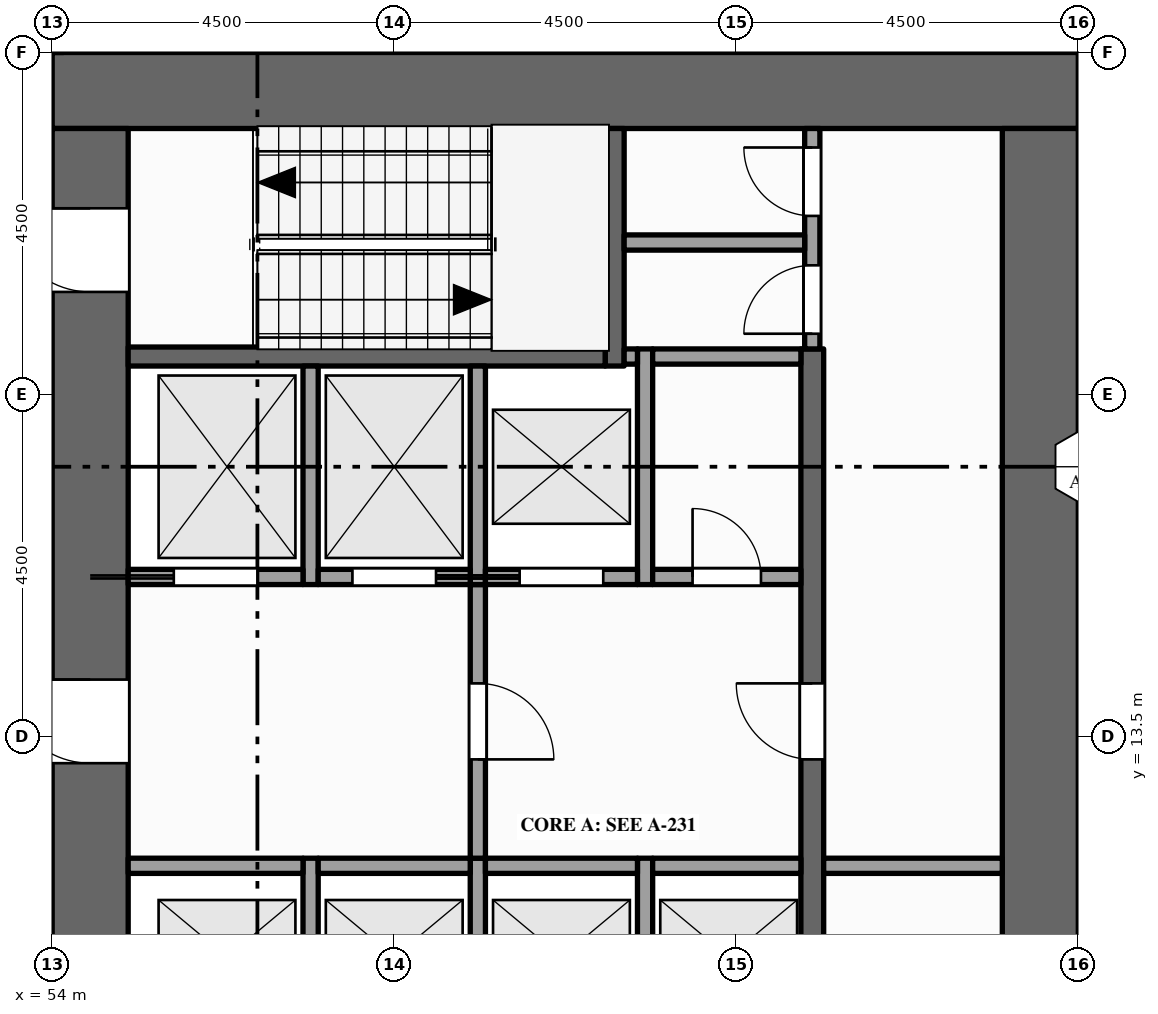
"""IFC4 building model, lengths in metres.
Left out: names, types, materials, properties, quantities, classifications, styles, units other than length and angle.
Written with IfcOpenShell. Run it as: python <this file> out.ifc"""

import sys

from ifc_helpers import new_model, si_unit, direction, frame, frame_2d, origin, place, context, subcontext, project, spatial, rectangle, extrude, element, fill, save


model = new_model("IFC4")
c1 = context("Model", 3, precision=1e-05, world=origin(), true_north=direction((0.0, 1.0)))
c2 = subcontext(c1, "Body", "Model", "MODEL_VIEW")
j1 = project(units=[si_unit("LENGTHUNIT", "METRE"), si_unit("PLANEANGLEUNIT", "RADIAN")], contexts=[c1])
p1 = place(None, origin())
s1 = spatial("IfcSite", under=j1, at=p1, CompositionType="ELEMENT")
p2 = place(p1, origin())
s2 = spatial("IfcBuilding", under=s1, at=p2, CompositionType="ELEMENT")
p3 = place(p2, frame((0.0, 0.0, 171.0)))
s3 = spatial("IfcBuildingStorey", under=s2, at=p3, CompositionType="ELEMENT", Elevation=171.0)
p4 = place(p3, frame((54.0, 22.0, -0.15), z_axis=(0.0, 0.0, 1.0), x_axis=(1.0, 0.0, 0.0)))
e1 = element("IfcWall", 1, at=p4, inside=s3, PredefinedType="SHEAR", context=c2, shape_type="SweptSolid", body=[
    extrude(rectangle(XDim=13.5, YDim=1.0, at=frame_2d((6.75, 0.0))), origin(), (0.0, 0.0, 1.0), 4.0),
])
p5 = place(p3, frame((54.5, 1.0, -0.15), z_axis=(0.0, 0.0, 1.0), x_axis=(0.0, 1.0, 0.0)))
e2 = element("IfcWall", 2, at=p5, inside=s3, PredefinedType="SHEAR", context=c2, shape_type="SweptSolid", body=[
    extrude(rectangle(XDim=20.5, YDim=1.0, at=frame_2d((10.25, 0.0))), origin(), (0.0, 0.0, 1.0), 4.0),
])
p6 = place(p5, frame((6.1, 0.0, 0.15)))
e3 = element("IfcOpeningElement", 3, at=p6, cuts=e2, PredefinedType="OPENING", context=c2, shape_type="SweptSolid", body=[
    extrude(rectangle(XDim=1.8, YDim=2.1, at=frame_2d((0.9, 1.05))), frame((0.0, 0.51, 0.0), z_axis=(0.0, -1.0, 0.0), x_axis=(1.0, 0.0, 0.0)), (0.0, 0.0, 1.0), 1.02),
])
p7 = place(p5, frame((12.15, 0.0, 0.15)))
e4 = element("IfcOpeningElement", 4, at=p7, cuts=e2, PredefinedType="OPENING", context=c2, shape_type="SweptSolid", body=[
    extrude(rectangle(XDim=1.1, YDim=2.1, at=frame_2d((0.55, 1.05))), frame((0.0, 0.51, 0.0), z_axis=(0.0, -1.0, 0.0), x_axis=(1.0, 0.0, 0.0)), (0.0, 0.0, 1.0), 1.02),
])
p8 = place(p5, frame((1.15, 0.0, 0.15)))
e5 = element("IfcOpeningElement", 5, at=p8, cuts=e2, PredefinedType="OPENING", context=c2, shape_type="SweptSolid", body=[
    extrude(rectangle(XDim=1.1, YDim=2.1, at=frame_2d((0.55, 1.05))), frame((0.0, 0.51, 0.0), z_axis=(0.0, -1.0, 0.0), x_axis=(1.0, 0.0, 0.0)), (0.0, 0.0, 1.0), 1.02),
])
p9 = place(p5, frame((18.35, 0.0, 0.15)))
e6 = element("IfcOpeningElement", 6, at=p9, cuts=e2, PredefinedType="OPENING", context=c2, shape_type="SweptSolid", body=[
    extrude(rectangle(XDim=1.1, YDim=2.1, at=frame_2d((0.55, 1.05))), frame((0.0, 0.51, 0.0), z_axis=(0.0, -1.0, 0.0), x_axis=(1.0, 0.0, 0.0)), (0.0, 0.0, 1.0), 1.02),
])
p10 = place(p3, frame((67.0, 1.0, -0.15), z_axis=(0.0, 0.0, 1.0), x_axis=(0.0, 1.0, 0.0)))
e7 = element("IfcWall", 7, at=p10, inside=s3, PredefinedType="SHEAR", context=c2, shape_type="SweptSolid", body=[
    extrude(rectangle(XDim=20.5, YDim=1.0, at=frame_2d((10.25, 0.0))), origin(), (0.0, 0.0, 1.0), 4.0),
])
p11 = place(p3, frame((54.0, 22.5, 0.0), z_axis=(0.0, 0.0, 1.0), x_axis=(0.0, 1.0, 0.0)))
e8 = element("IfcWall", 8, at=p11, inside=s3, PredefinedType="STANDARD", context=c2, shape_type="SweptSolid", body=[
    extrude(rectangle(XDim=1.05, YDim=0.3, at=frame_2d((0.525, 0.0))), origin(), (0.0, 0.0, 1.0), 3.149),
])
p12 = place(p3, frame((57.4, 9.3, 0.0), z_axis=(0.0, 0.0, 1.0), x_axis=(0.0, 1.0, 0.0)))
e9 = element("IfcWall", 9, at=p12, inside=s3, PredefinedType="SOLIDWALL", context=c2, shape_type="SweptSolid", body=[
    extrude(rectangle(XDim=2.6, YDim=0.2, at=frame_2d((1.3, 0.0))), origin(), (0.0, 0.0, 1.0), 3.85),
])
p13 = place(p3, frame((57.4, 15.5, 0.0), z_axis=(0.0, 0.0, 1.0), x_axis=(0.0, 1.0, 0.0)))
e10 = element("IfcWall", 10, at=p13, inside=s3, PredefinedType="SOLIDWALL", context=c2, shape_type="SweptSolid", body=[
    extrude(rectangle(XDim=2.875, YDim=0.2, at=frame_2d((1.438, 0.0))), origin(), (0.0, 0.0, 1.0), 3.85),
])
p14 = place(p3, frame((59.6, 9.3, 0.0), z_axis=(0.0, 0.0, 1.0), x_axis=(0.0, 1.0, 0.0)))
e11 = element("IfcWall", 11, at=p14, inside=s3, PredefinedType="SOLIDWALL", context=c2, shape_type="SweptSolid", body=[
    extrude(rectangle(XDim=2.6, YDim=0.2, at=frame_2d((1.3, 0.0))), origin(), (0.0, 0.0, 1.0), 3.85),
])
p15 = place(p3, frame((59.6, 11.9, 0.0), z_axis=(0.0, 0.0, 1.0), x_axis=(0.0, 1.0, 0.0)))
e12 = element("IfcWall", 12, at=p15, inside=s3, PredefinedType="PARTITIONING", context=c2, shape_type="SweptSolid", body=[
    extrude(rectangle(XDim=3.6, YDim=0.2, at=frame_2d((1.8, 0.0))), origin(), (0.0, 0.0, 1.0), 3.85),
])
p16 = place(p15, frame((1.3, 0.0, 0.0)))
e13 = element("IfcOpeningElement", 13, at=p16, cuts=e12, PredefinedType="OPENING", context=c2, shape_type="SweptSolid", body=[
    extrude(rectangle(XDim=1.0, YDim=2.1, at=frame_2d((0.5, 1.05))), frame((0.0, 0.11, 0.0), z_axis=(0.0, -1.0, 0.0), x_axis=(1.0, 0.0, 0.0)), (0.0, 0.0, 1.0), 0.22),
])
p17 = place(p3, frame((59.6, 15.5, 0.0), z_axis=(0.0, 0.0, 1.0), x_axis=(0.0, 1.0, 0.0)))
e14 = element("IfcWall", 14, at=p17, inside=s3, PredefinedType="SOLIDWALL", context=c2, shape_type="SweptSolid", body=[
    extrude(rectangle(XDim=2.875, YDim=0.2, at=frame_2d((1.438, 0.0))), origin(), (0.0, 0.0, 1.0), 3.85),
])
p18 = place(p3, frame((61.4, 18.375, 0.0), z_axis=(0.0, 0.0, 1.0), x_axis=(0.0, 1.0, 0.0)))
e15 = element("IfcWall", 15, at=p18, inside=s3, PredefinedType="SHEAR", context=c2, shape_type="SweptSolid", body=[
    extrude(rectangle(XDim=3.125, YDim=0.25, at=frame_2d((1.562, 0.0))), origin(), (0.0, 0.0, 1.0), 3.85),
])
p19 = place(p3, frame((61.8, 9.3, 0.0), z_axis=(0.0, 0.0, 1.0), x_axis=(0.0, 1.0, 0.0)))
e16 = element("IfcWall", 16, at=p19, inside=s3, PredefinedType="SOLIDWALL", context=c2, shape_type="SweptSolid", body=[
    extrude(rectangle(XDim=2.6, YDim=0.2, at=frame_2d((1.3, 0.0))), origin(), (0.0, 0.0, 1.0), 3.85),
])
p20 = place(p3, frame((61.8, 15.5, 0.0), z_axis=(0.0, 0.0, 1.0), x_axis=(0.0, 1.0, 0.0)))
e17 = element("IfcWall", 17, at=p20, inside=s3, PredefinedType="SOLIDWALL", context=c2, shape_type="SweptSolid", body=[
    extrude(rectangle(XDim=3.1, YDim=0.2, at=frame_2d((1.55, 0.0))), origin(), (0.0, 0.0, 1.0), 3.85),
])
p21 = place(p3, frame((64.0, 4.1, 0.0), z_axis=(0.0, 0.0, 1.0), x_axis=(0.0, 1.0, 0.0)))
e18 = element("IfcWall", 18, at=p21, inside=s3, PredefinedType="SHEAR", context=c2, shape_type="SweptSolid", body=[
    extrude(rectangle(XDim=14.5, YDim=0.3, at=frame_2d((7.25, 0.0))), origin(), (0.0, 0.0, 1.0), 3.85),
])
p22 = place(p21, frame((3.4, 0.0, 0.0)))
e19 = element("IfcOpeningElement", 19, at=p22, cuts=e18, PredefinedType="OPENING", context=c2, shape_type="SweptSolid", body=[
    extrude(rectangle(XDim=1.0, YDim=2.1, at=frame_2d((0.5, 1.05))), frame((0.0, 0.16, 0.0), z_axis=(0.0, -1.0, 0.0), x_axis=(1.0, 0.0, 0.0)), (0.0, 0.0, 1.0), 0.32),
])
p23 = place(p21, frame((9.1, 0.0, 0.0)))
e20 = element("IfcOpeningElement", 20, at=p23, cuts=e18, PredefinedType="OPENING", context=c2, shape_type="SweptSolid", body=[
    extrude(rectangle(XDim=1.0, YDim=2.1, at=frame_2d((0.5, 1.05))), frame((0.0, 0.16, 0.0), z_axis=(0.0, -1.0, 0.0), x_axis=(1.0, 0.0, 0.0)), (0.0, 0.0, 1.0), 0.32),
])
p24 = place(p3, frame((64.0, 18.6, 0.0), z_axis=(0.0, 0.0, 1.0), x_axis=(0.0, 1.0, 0.0)))
e21 = element("IfcWall", 21, at=p24, inside=s3, PredefinedType="PARTITIONING", context=c2, shape_type="SweptSolid", body=[
    extrude(rectangle(XDim=2.9, YDim=0.2, at=frame_2d((1.45, 0.0))), origin(), (0.0, 0.0, 1.0), 3.85),
])
p25 = place(p24, frame((0.2, 0.0, 0.0)))
e22 = element("IfcOpeningElement", 22, at=p25, cuts=e21, PredefinedType="OPENING", context=c2, shape_type="SweptSolid", body=[
    extrude(rectangle(XDim=0.9, YDim=2.1, at=frame_2d((0.45, 1.05))), frame((0.0, 0.11, 0.0), z_axis=(0.0, -1.0, 0.0), x_axis=(1.0, 0.0, 0.0)), (0.0, 0.0, 1.0), 0.22),
])
p26 = place(p24, frame((1.75, 0.0, 0.0)))
e23 = element("IfcOpeningElement", 23, at=p26, cuts=e21, PredefinedType="OPENING", context=c2, shape_type="SweptSolid", body=[
    extrude(rectangle(XDim=0.9, YDim=2.1, at=frame_2d((0.45, 1.05))), frame((0.0, 0.11, 0.0), z_axis=(0.0, -1.0, 0.0), x_axis=(1.0, 0.0, 0.0)), (0.0, 0.0, 1.0), 0.22),
])
p27 = place(p3, frame((55.0, 11.8, 0.0), z_axis=(0.0, 0.0, 1.0), x_axis=(1.0, 0.0, 0.0)))
e24 = element("IfcWall", 24, at=p27, inside=s3, PredefinedType="SOLIDWALL", context=c2, shape_type="SweptSolid", body=[
    extrude(rectangle(XDim=2.3, YDim=0.2, at=frame_2d((1.15, 0.0))), origin(), (0.0, 0.0, 1.0), 3.85),
])
for number, where, z_axis, x_axis in (
    (25, (57.5, 11.8, 0.0), (0.0, 0.0, 1.0), (1.0, 0.0, 0.0)),
    (26, (59.7, 11.8, 0.0), (0.0, 0.0, 1.0), (1.0, 0.0, 0.0)),
):
    element("IfcWall", number, at=place(p3, frame(where, z_axis=z_axis, x_axis=x_axis)), inside=s3, PredefinedType="SOLIDWALL", context=c2, shape_type="SweptSolid", body=[
        extrude(rectangle(XDim=2.0, YDim=0.2, at=frame_2d((1.0, 0.0))), origin(), (0.0, 0.0, 1.0), 3.85),
    ])
p28 = place(p3, frame((61.9, 11.8, 0.0), z_axis=(0.0, 0.0, 1.0), x_axis=(1.0, 0.0, 0.0)))
e27 = element("IfcWall", 27, at=p28, inside=s3, PredefinedType="SOLIDWALL", context=c2, shape_type="SweptSolid", body=[
    extrude(rectangle(XDim=1.95, YDim=0.2, at=frame_2d((0.975, 0.0))), origin(), (0.0, 0.0, 1.0), 3.85),
])
p29 = place(p3, frame((64.15, 11.8, 0.0), z_axis=(0.0, 0.0, 1.0), x_axis=(1.0, 0.0, 0.0)))
e28 = element("IfcWall", 28, at=p29, inside=s3, PredefinedType="PARTITIONING", context=c2, shape_type="SweptSolid", body=[
    extrude(rectangle(XDim=2.35, YDim=0.2, at=frame_2d((1.175, 0.0))), origin(), (0.0, 0.0, 1.0), 3.85),
])
p30 = place(p3, frame((55.0, 15.6, 0.0), z_axis=(0.0, 0.0, 1.0), x_axis=(1.0, 0.0, 0.0)))
e29 = element("IfcWall", 29, at=p30, inside=s3, PredefinedType="SOLIDWALL", context=c2, shape_type="SweptSolid", body=[
    extrude(rectangle(XDim=2.3, YDim=0.2, at=frame_2d((1.15, 0.0))), origin(), (0.0, 0.0, 1.0), 3.85),
])
p31 = place(p30, frame((0.6, 0.0, 0.012)))
e30 = element("IfcOpeningElement", 30, at=p31, cuts=e29, PredefinedType="OPENING", context=c2, shape_type="SweptSolid", body=[
    extrude(rectangle(XDim=1.1, YDim=2.1, at=frame_2d((0.55, 1.05))), frame((0.0, 0.11, 0.0), z_axis=(0.0, -1.0, 0.0), x_axis=(1.0, 0.0, 0.0)), (0.0, 0.0, 1.0), 0.22),
])
p32 = place(p3, frame((57.5, 15.6, 0.0), z_axis=(0.0, 0.0, 1.0), x_axis=(1.0, 0.0, 0.0)))
e31 = element("IfcWall", 31, at=p32, inside=s3, PredefinedType="SOLIDWALL", context=c2, shape_type="SweptSolid", body=[
    extrude(rectangle(XDim=2.0, YDim=0.2, at=frame_2d((1.0, 0.0))), origin(), (0.0, 0.0, 1.0), 3.85),
])
p33 = place(p32, frame((0.45, 0.0, 0.012)))
e32 = element("IfcOpeningElement", 32, at=p33, cuts=e31, PredefinedType="OPENING", context=c2, shape_type="SweptSolid", body=[
    extrude(rectangle(XDim=1.1, YDim=2.1, at=frame_2d((0.55, 1.05))), frame((0.0, 0.11, 0.0), z_axis=(0.0, -1.0, 0.0), x_axis=(1.0, 0.0, 0.0)), (0.0, 0.0, 1.0), 0.22),
])
p34 = place(p3, frame((59.7, 15.6, 0.0), z_axis=(0.0, 0.0, 1.0), x_axis=(1.0, 0.0, 0.0)))
e33 = element("IfcWall", 33, at=p34, inside=s3, PredefinedType="SOLIDWALL", context=c2, shape_type="SweptSolid", body=[
    extrude(rectangle(XDim=2.0, YDim=0.2, at=frame_2d((1.0, 0.0))), origin(), (0.0, 0.0, 1.0), 3.85),
])
p35 = place(p34, frame((0.45, 0.0, 0.012)))
e34 = element("IfcOpeningElement", 34, at=p35, cuts=e33, PredefinedType="OPENING", context=c2, shape_type="SweptSolid", body=[
    extrude(rectangle(XDim=1.1, YDim=2.1, at=frame_2d((0.55, 1.05))), frame((0.0, 0.11, 0.0), z_axis=(0.0, -1.0, 0.0), x_axis=(1.0, 0.0, 0.0)), (0.0, 0.0, 1.0), 0.22),
])
p36 = place(p3, frame((61.9, 15.6, 0.0), z_axis=(0.0, 0.0, 1.0), x_axis=(1.0, 0.0, 0.0)))
e35 = element("IfcWall", 35, at=p36, inside=s3, PredefinedType="PARTITIONING", context=c2, shape_type="SweptSolid", body=[
    extrude(rectangle(XDim=1.95, YDim=0.2, at=frame_2d((0.975, 0.0))), origin(), (0.0, 0.0, 1.0), 3.85),
])
p37 = place(p36, frame((0.525, 0.0, 0.0)))
e36 = element("IfcOpeningElement", 36, at=p37, cuts=e35, PredefinedType="OPENING", context=c2, shape_type="SweptSolid", body=[
    extrude(rectangle(XDim=0.9, YDim=2.1, at=frame_2d((0.45, 1.05))), frame((0.0, 0.11, 0.0), z_axis=(0.0, -1.0, 0.0), x_axis=(1.0, 0.0, 0.0)), (0.0, 0.0, 1.0), 0.22),
])
p38 = place(p3, frame((55.0, 18.5, 0.0), z_axis=(0.0, 0.0, 1.0), x_axis=(1.0, 0.0, 0.0)))
e37 = element("IfcWall", 37, at=p38, inside=s3, PredefinedType="SHEAR", context=c2, shape_type="SweptSolid", body=[
    extrude(rectangle(XDim=6.275, YDim=0.25, at=frame_2d((3.137, 0.0))), origin(), (0.0, 0.0, 1.0), 3.85),
])
p39 = place(p3, frame((61.525, 18.5, 0.0), z_axis=(0.0, 0.0, 1.0), x_axis=(1.0, 0.0, 0.0)))
e38 = element("IfcWall", 38, at=p39, inside=s3, PredefinedType="SOLIDWALL", context=c2, shape_type="SweptSolid", body=[
    extrude(rectangle(XDim=0.175, YDim=0.2, at=frame_2d((0.087, 0.0))), origin(), (0.0, 0.0, 1.0), 3.85),
])
p40 = place(p3, frame((61.9, 18.5, 0.0), z_axis=(0.0, 0.0, 1.0), x_axis=(1.0, 0.0, 0.0)))
e39 = element("IfcWall", 39, at=p40, inside=s3, PredefinedType="PARTITIONING", context=c2, shape_type="SweptSolid", body=[
    extrude(rectangle(XDim=1.95, YDim=0.2, at=frame_2d((0.975, 0.0))), origin(), (0.0, 0.0, 1.0), 3.85),
])
p41 = place(p3, frame((61.525, 20.0, 0.0), z_axis=(0.0, 0.0, 1.0), x_axis=(1.0, 0.0, 0.0)))
e40 = element("IfcWall", 40, at=p41, inside=s3, PredefinedType="PARTITIONING", context=c2, shape_type="SweptSolid", body=[
    extrude(rectangle(XDim=2.375, YDim=0.2, at=frame_2d((1.188, 0.0))), origin(), (0.0, 0.0, 1.0), 3.85),
])
p42 = place(p31, origin())
e41 = element("IfcDoor", 41, at=p42, inside=s3, OperationType="SLIDING_TO_LEFT", PredefinedType="DOOR", context=c2, shape_type="SweptSolid", body=[
    extrude(rectangle(XDim=1.1, YDim=2.1, at=frame_2d((0.55, 1.05))), frame((0.0, 0.025, 0.0), z_axis=(0.0, -1.0, 0.0), x_axis=(1.0, 0.0, 0.0)), (0.0, 0.0, 1.0), 0.05),
])
fill(e30, e41)
p43 = place(p33, origin())
e42 = element("IfcDoor", 42, at=p43, inside=s3, OperationType="SLIDING_TO_RIGHT", PredefinedType="DOOR", context=c2, shape_type="SweptSolid", body=[
    extrude(rectangle(XDim=1.1, YDim=2.1, at=frame_2d((0.55, 1.05))), frame((0.0, 0.025, 0.0), z_axis=(0.0, -1.0, 0.0), x_axis=(1.0, 0.0, 0.0)), (0.0, 0.0, 1.0), 0.05),
])
fill(e32, e42)
p44 = place(p35, origin())
e43 = element("IfcDoor", 43, at=p44, inside=s3, OperationType="SLIDING_TO_LEFT", PredefinedType="DOOR", context=c2, shape_type="SweptSolid", body=[
    extrude(rectangle(XDim=1.1, YDim=2.1, at=frame_2d((0.55, 1.05))), frame((0.0, 0.025, 0.0), z_axis=(0.0, -1.0, 0.0), x_axis=(1.0, 0.0, 0.0)), (0.0, 0.0, 1.0), 0.05),
])
fill(e34, e43)
p45 = place(p7, origin())
e44 = element("IfcDoor", 44, at=p45, inside=s3, OperationType="SINGLE_SWING_RIGHT", PredefinedType="DOOR", context=c2, shape_type="SweptSolid", body=[
    extrude(rectangle(XDim=1.1, YDim=2.1, at=frame_2d((0.55, 1.05))), frame((0.0, 0.025, 0.0), z_axis=(0.0, -1.0, 0.0), x_axis=(1.0, 0.0, 0.0)), (0.0, 0.0, 1.0), 0.05),
])
fill(e4, e44)
p46 = place(p16, origin())
e45 = element("IfcDoor", 45, at=p46, inside=s3, OperationType="SINGLE_SWING_LEFT", PredefinedType="DOOR", context=c2, shape_type="SweptSolid", body=[
    extrude(rectangle(XDim=1.0, YDim=2.1, at=frame_2d((0.5, 1.05))), frame((0.0, 0.025, 0.0), z_axis=(0.0, -1.0, 0.0), x_axis=(1.0, 0.0, 0.0)), (0.0, 0.0, 1.0), 0.05),
])
fill(e13, e45)
p47 = place(p23, origin())
e46 = element("IfcDoor", 46, at=p47, inside=s3, OperationType="SINGLE_SWING_RIGHT", PredefinedType="DOOR", context=c2, shape_type="SweptSolid", body=[
    extrude(rectangle(XDim=1.0, YDim=2.1, at=frame_2d((0.5, 1.05))), frame((0.0, 0.025, 0.0), z_axis=(0.0, -1.0, 0.0), x_axis=(1.0, 0.0, 0.0)), (0.0, 0.0, 1.0), 0.05),
])
fill(e20, e46)
p48 = place(p9, origin())
e47 = element("IfcDoor", 47, at=p48, inside=s3, OperationType="SINGLE_SWING_RIGHT", PredefinedType="DOOR", context=c2, shape_type="SweptSolid", body=[
    extrude(rectangle(XDim=1.1, YDim=2.1, at=frame_2d((0.55, 1.05))), frame((0.0, 0.025, 0.0), z_axis=(0.0, -1.0, 0.0), x_axis=(1.0, 0.0, 0.0)), (0.0, 0.0, 1.0), 0.05),
])
fill(e6, e47)
p49 = place(p25, origin())
e48 = element("IfcDoor", 48, at=p49, inside=s3, OperationType="SINGLE_SWING_LEFT", PredefinedType="DOOR", context=c2, shape_type="SweptSolid", body=[
    extrude(rectangle(XDim=0.9, YDim=2.1, at=frame_2d((0.45, 1.05))), frame((0.0, 0.025, 0.0), z_axis=(0.0, -1.0, 0.0), x_axis=(1.0, 0.0, 0.0)), (0.0, 0.0, 1.0), 0.05),
])
fill(e22, e48)
p50 = place(p26, origin())
e49 = element("IfcDoor", 49, at=p50, inside=s3, OperationType="SINGLE_SWING_RIGHT", PredefinedType="DOOR", context=c2, shape_type="SweptSolid", body=[
    extrude(rectangle(XDim=0.9, YDim=2.1, at=frame_2d((0.45, 1.05))), frame((0.0, 0.025, 0.0), z_axis=(0.0, -1.0, 0.0), x_axis=(1.0, 0.0, 0.0)), (0.0, 0.0, 1.0), 0.05),
])
fill(e23, e49)
p51 = place(p37, origin())
e50 = element("IfcDoor", 50, at=p51, inside=s3, OperationType="SINGLE_SWING_LEFT", PredefinedType="DOOR", context=c2, shape_type="SweptSolid", body=[
    extrude(rectangle(XDim=0.9, YDim=2.1, at=frame_2d((0.45, 1.05))), frame((0.0, 0.025, 0.0), z_axis=(0.0, -1.0, 0.0), x_axis=(1.0, 0.0, 0.0)), (0.0, 0.0, 1.0), 0.05),
])
fill(e36, e50)
save(model, sys.argv[1])
